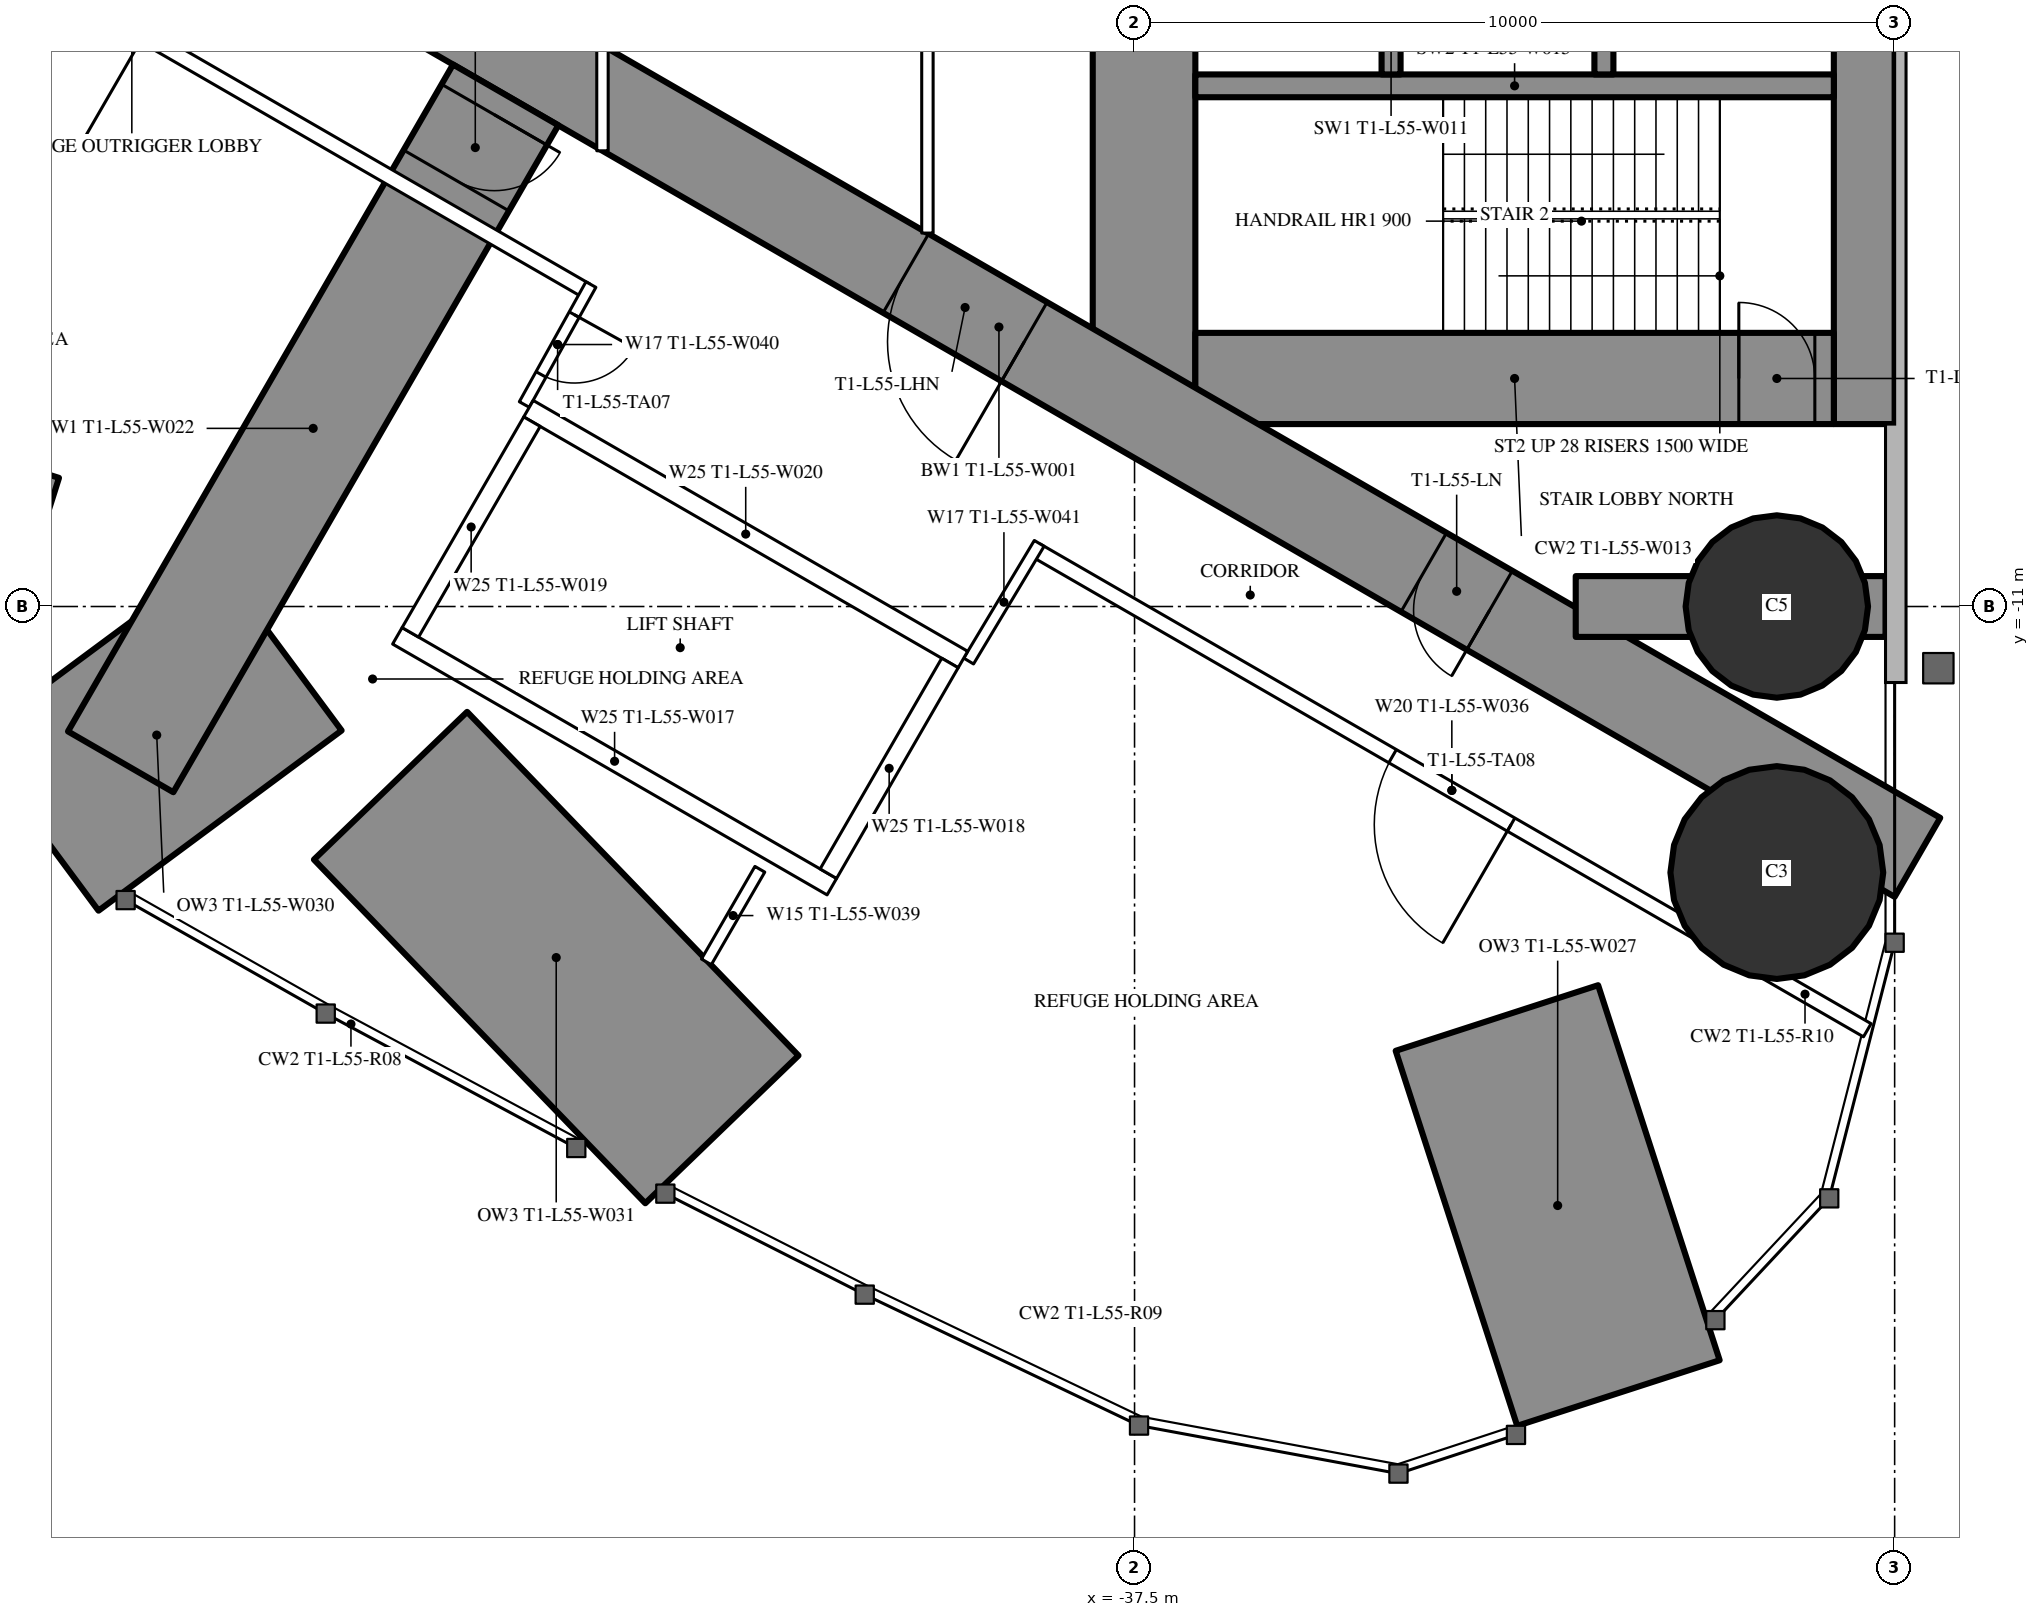
"""IFC4 building model, lengths in metres.
Left out: names, types, materials, properties, quantities, classifications, styles, units other than length and angle.
Written with IfcOpenShell. Run it as: python <this file> out.ifc"""

import sys

from ifc_helpers import new_model, si_unit, direction, frame, frame_2d, origin, origin_2d, place, context, subcontext, project, spatial, rectangle, circle, hollow_circle, extrude, element, fill, save


model = new_model("IFC4")
c1 = context("Model", 3, precision=1e-05, world=origin(), true_north=direction((0.0, 1.0)))
c2 = subcontext(c1, "Body", "Model", "MODEL_VIEW")
j1 = project(units=[si_unit("LENGTHUNIT", "METRE"), si_unit("PLANEANGLEUNIT", "RADIAN")], contexts=[c1])
p1 = place(None, origin())
s1 = spatial("IfcSite", under=j1, at=p1, CompositionType="ELEMENT")
p2 = place(p1, origin())
s2 = spatial("IfcBuilding", under=s1, at=p2, CompositionType="ELEMENT")
p3 = place(p2, frame((0.0, 0.0, 205.3)))
s3 = spatial("IfcBuildingStorey", under=s2, at=p3, CompositionType="ELEMENT", Elevation=205.3)
p4 = place(p3, frame((-31.134, -21.348, 0.0), z_axis=(0.0, 0.0, 1.0), x_axis=(-0.308266410133, 0.951300068529, 0.0)))
e1 = element("IfcWall", 1, at=p4, inside=s3, PredefinedType="SHEAR", context=c2, shape_type="SweptSolid", body=[
    extrude(rectangle(XDim=5.187, YDim=2.8, at=frame_2d((2.593, 0.0))), origin(), (0.0, 0.0, 1.0), 5.0),
])
p5 = place(p3, frame((-29.05, -11.0, 0.0), z_axis=(0.0, 0.0, 1.0), x_axis=(1.0, 0.0, 0.0)))
e2 = element("IfcColumn", 2, at=p5, inside=s3, PredefinedType="COLUMN", context=c2, shape_type="SweptSolid", body=[
    extrude(hollow_circle(Radius=1.2, WallThickness=0.09, at=origin_2d()), origin(), (0.0, 0.0, 1.0), 5.0),
])
p6 = place(p3, frame((-29.05, -14.5, 0.0), z_axis=(0.0, 0.0, 1.0), x_axis=(1.0, 0.0, 0.0)))
e3 = element("IfcColumn", 3, at=p6, inside=s3, PredefinedType="COLUMN", context=c2, shape_type="SweptSolid", body=[
    extrude(circle(Radius=1.4, at=origin_2d()), origin(), (0.0, 0.0, 1.0), 5.0),
])
p7 = place(p3, frame((-58.924, -8.47, 0.0), z_axis=(0.0, 0.0, 1.0), x_axis=(0.953237559777, -0.302222028698, 0.0)))
e4 = element("IfcWall", 4, at=p7, inside=s3, PredefinedType="SHEAR", context=c2, shape_type="SweptSolid", body=[
    extrude(rectangle(XDim=7.187, YDim=2.8, at=frame_2d((3.594, 0.0))), origin(), (0.0, 0.0, 1.0), 5.0),
])
p8 = place(p3, frame((-51.964, -13.877, 0.0), z_axis=(0.0, 0.0, 1.0), x_axis=(0.80337247009, 0.595476846151, 0.0)))
e5 = element("IfcWall", 5, at=p8, inside=s3, PredefinedType="SHEAR", context=c2, shape_type="SweptSolid", body=[
    extrude(rectangle(XDim=3.981, YDim=2.8, at=frame_2d((1.99, 0.0))), origin(), (0.0, 0.0, 1.0), 5.0),
])
p9 = place(p3, frame((-42.929, -17.879, 0.0), z_axis=(0.0, 0.0, 1.0), x_axis=(-0.694103918888, 0.719874815356, 0.0)))
e6 = element("IfcWall", 6, at=p9, inside=s3, PredefinedType="SHEAR", context=c2, shape_type="SweptSolid", body=[
    extrude(rectangle(XDim=6.281, YDim=2.8, at=frame_2d((3.141, 0.0))), origin(), (0.0, 0.0, 1.0), 5.0),
])
p10 = place(p3, frame((-27.9, 8.6, 0.0), z_axis=(0.0, 0.0, 1.0), x_axis=(0.0, -1.0, 0.0)))
e7 = element("IfcWall", 7, at=p10, inside=s3, PredefinedType="SHEAR", context=c2, shape_type="SweptSolid", body=[
    extrude(rectangle(XDim=17.2, YDim=0.8, at=frame_2d((8.6, 0.0))), origin(), (0.0, 0.0, 1.0), 5.0),
])
p11 = place(p10, frame((6.95, 0.0, 0.0)))
e8 = element("IfcOpeningElement", 8, at=p11, cuts=e7, PredefinedType="OPENING", context=c2, shape_type="SweptSolid", body=[
    extrude(rectangle(XDim=0.9, YDim=2.2, at=frame_2d((0.45, 1.1))), frame((0.0, 0.41, 0.0), z_axis=(0.0, -1.0, 0.0), x_axis=(1.0, 0.0, 0.0)), (0.0, 0.0, 1.0), 0.82),
])
p12 = place(p3, frame((-37.375, 8.6, 0.0), z_axis=(0.0, 0.0, 1.0), x_axis=(0.0, -1.0, 0.0)))
e9 = element("IfcWall", 9, at=p12, inside=s3, PredefinedType="SHEAR", context=c2, shape_type="SweptSolid", body=[
    extrude(rectangle(XDim=17.2, YDim=1.35, at=frame_2d((8.6, 0.0))), origin(), (0.0, 0.0, 1.0), 5.0),
])
p13 = place(p12, frame((7.7, 0.0, 0.0)))
e10 = element("IfcOpeningElement", 10, at=p13, cuts=e9, PredefinedType="OPENING", context=c2, shape_type="SweptSolid", body=[
    extrude(rectangle(XDim=1.8, YDim=2.2, at=frame_2d((0.9, 1.1))), frame((0.0, 0.685, 0.0), z_axis=(0.0, -1.0, 0.0), x_axis=(1.0, 0.0, 0.0)), (0.0, 0.0, 1.0), 1.37),
])
p14 = place(p3, frame((-28.3, -8.0, 0.0), z_axis=(0.0, 0.0, 1.0), x_axis=(-1.0, 0.0, 0.0)))
e11 = element("IfcWall", 11, at=p14, inside=s3, PredefinedType="SHEAR", context=c2, shape_type="SweptSolid", body=[
    extrude(rectangle(XDim=8.4, YDim=1.2, at=frame_2d((4.2, 0.0))), origin(), (0.0, 0.0, 1.0), 5.0),
])
p15 = place(p14, frame((0.25, 0.0, 0.0)))
e12 = element("IfcOpeningElement", 12, at=p15, cuts=e11, PredefinedType="OPENING", context=c2, shape_type="SweptSolid", body=[
    extrude(rectangle(XDim=1.0, YDim=2.2, at=frame_2d((0.5, 1.1))), frame((0.0, 0.61, 0.0), z_axis=(0.0, -1.0, 0.0), x_axis=(1.0, 0.0, 0.0)), (0.0, 0.0, 1.0), 1.22),
])
p16 = place(p3, frame((-28.3, -4.15, 0.0), z_axis=(0.0, 0.0, 1.0), x_axis=(-1.0, 0.0, 0.0)))
e13 = element("IfcWall", 13, at=p16, inside=s3, PredefinedType="SHEAR", context=c2, shape_type="SweptSolid", body=[
    extrude(rectangle(XDim=8.4, YDim=0.3, at=frame_2d((4.2, 0.0))), origin(), (0.0, 0.0, 1.0), 5.0),
])
p17 = place(p3, frame((-31.325, -1.9, 0.0), z_axis=(0.0, 0.0, 1.0), x_axis=(0.0, -1.0, 0.0)))
e14 = element("IfcWall", 14, at=p17, inside=s3, PredefinedType="SHEAR", context=c2, shape_type="SweptSolid", body=[
    extrude(rectangle(XDim=2.1, YDim=0.25, at=frame_2d((1.05, 0.0))), origin(), (0.0, 0.0, 1.0), 5.0),
])
p18 = place(p17, frame((0.5, 0.0, 0.0)))
e15 = element("IfcOpeningElement", 15, at=p18, cuts=e14, PredefinedType="OPENING", context=c2, shape_type="SweptSolid", body=[
    extrude(rectangle(XDim=1.1, YDim=2.2, at=frame_2d((0.55, 1.1))), frame((0.0, 0.135, 0.0), z_axis=(0.0, -1.0, 0.0), x_axis=(1.0, 0.0, 0.0)), (0.0, 0.0, 1.0), 0.27),
])
p19 = place(p3, frame((-34.125, -1.65, 0.0), z_axis=(0.0, 0.0, 1.0), x_axis=(0.0, -1.0, 0.0)))
e16 = element("IfcWall", 16, at=p19, inside=s3, PredefinedType="SHEAR", context=c2, shape_type="SweptSolid", body=[
    extrude(rectangle(XDim=2.35, YDim=0.25, at=frame_2d((1.175, 0.0))), origin(), (0.0, 0.0, 1.0), 5.0),
])
p20 = place(p19, frame((0.875, 0.0, 0.0)))
e17 = element("IfcOpeningElement", 17, at=p20, cuts=e16, PredefinedType="OPENING", context=c2, shape_type="SweptSolid", body=[
    extrude(rectangle(XDim=0.6, YDim=2.0, at=frame_2d((0.3, 1.0))), frame((0.0, 0.135, 0.0), z_axis=(0.0, -1.0, 0.0), x_axis=(1.0, 0.0, 0.0)), (0.0, 0.0, 1.0), 0.27),
])
p21 = place(p3, frame((-27.2, -14.3, 0.0), z_axis=(0.0, 0.0, 1.0), x_axis=(-0.866024021859, 0.500002393557, 0.0)))
e18 = element("IfcWall", 18, at=p21, inside=s3, PredefinedType="SHEAR", context=c2, shape_type="SweptSolid", body=[
    extrude(rectangle(XDim=27.907, YDim=1.2, at=frame_2d((13.954, 0.0))), origin(), (0.0, 0.0, 1.0), 5.0),
])
p22 = place(p21, frame((6.5, 0.0, 0.0)))
e19 = element("IfcOpeningElement", 19, at=p22, cuts=e18, PredefinedType="OPENING", context=c2, shape_type="SweptSolid", body=[
    extrude(rectangle(XDim=1.0, YDim=2.2, at=frame_2d((0.5, 1.1))), frame((0.0, 0.61, 0.0), z_axis=(0.0, -1.0, 0.0), x_axis=(1.0, 0.0, 0.0)), (0.0, 0.0, 1.0), 1.22),
])
p23 = place(p21, frame((13.568, 0.0, 0.0)))
e20 = element("IfcOpeningElement", 20, at=p23, cuts=e18, PredefinedType="OPENING", context=c2, shape_type="SweptSolid", body=[
    extrude(rectangle(XDim=1.8, YDim=2.2, at=frame_2d((0.9, 1.1))), frame((0.0, 0.61, 0.0), z_axis=(0.0, -1.0, 0.0), x_axis=(1.0, 0.0, 0.0)), (0.0, 0.0, 1.0), 1.22),
])
p24 = place(p3, frame((-27.62, -11.0, 0.0), z_axis=(0.0, 0.0, 1.0), x_axis=(-1.0, 0.0, 0.0)))
e21 = element("IfcWall", 21, at=p24, inside=s3, PredefinedType="SHEAR", context=c2, shape_type="SweptSolid", body=[
    extrude(rectangle(XDim=4.076, YDim=0.8, at=frame_2d((2.038, 0.0))), origin(), (0.0, 0.0, 1.0), 5.0),
])
p25 = place(p3, frame((-45.773, -4.27, 0.0), z_axis=(0.0, 0.0, 1.0), x_axis=(-0.499995723283, -0.866027872934, 0.0)))
e22 = element("IfcWall", 22, at=p25, inside=s3, PredefinedType="SHEAR", context=c2, shape_type="SweptSolid", body=[
    extrude(rectangle(XDim=10.131, YDim=1.6, at=frame_2d((5.065, 0.0))), origin(), (0.0, 0.0, 1.0), 5.0),
])
p26 = place(p25, frame((0.3, 0.0, 0.0)))
e23 = element("IfcOpeningElement", 23, at=p26, cuts=e22, PredefinedType="OPENING", context=c2, shape_type="SweptSolid", body=[
    extrude(rectangle(XDim=1.0, YDim=2.2, at=frame_2d((0.5, 1.1))), frame((0.0, 0.81, 0.0), z_axis=(0.0, -1.0, 0.0), x_axis=(1.0, 0.0, 0.0)), (0.0, 0.0, 1.0), 1.62),
])
p27 = place(p3, frame((-42.429, -14.457, 0.0), z_axis=(0.0, 0.0, 1.0), x_axis=(-0.5000578829, -0.865991982497, 0.0)))
e24 = element("IfcWall", 24, at=p27, inside=s3, PredefinedType="PARTITIONING", context=c2, shape_type="SweptSolid", body=[
    extrude(rectangle(XDim=1.407, YDim=0.15, at=frame_2d((0.704, 0.0))), origin(), (0.0, 0.0, 1.0), 4.75),
])
p28 = place(p3, frame((-27.86, -16.575, 0.0), z_axis=(0.0, 0.0, 1.0), x_axis=(-0.866027756871, 0.499995924312, 0.0)))
e25 = element("IfcWall", 25, at=p28, inside=s3, PredefinedType="PARTITIONING", context=c2, shape_type="SweptSolid", body=[
    extrude(rectangle(XDim=12.622, YDim=0.2, at=frame_2d((6.311, 0.0))), origin(), (0.0, 0.0, 1.0), 4.75),
])
p29 = place(p28, frame((5.411, 0.0, 0.0)))
e26 = element("IfcOpeningElement", 26, at=p29, cuts=e25, PredefinedType="OPENING", context=c2, shape_type="SweptSolid", body=[
    extrude(rectangle(XDim=1.8, YDim=2.2, at=frame_2d((0.9, 1.1))), frame((0.0, 0.11, 0.0), z_axis=(0.0, -1.0, 0.0), x_axis=(1.0, 0.0, 0.0)), (0.0, 0.0, 1.0), 0.22),
])
p30 = place(p3, frame((-44.715, -6.844, 0.0), z_axis=(0.0, 0.0, 1.0), x_axis=(-0.866025261224, 0.500000246922, 0.0)))
e27 = element("IfcWall", 27, at=p30, inside=s3, PredefinedType="PARTITIONING", context=c2, shape_type="SweptSolid", body=[
    extrude(rectangle(XDim=13.567, YDim=0.2, at=frame_2d((6.783, 0.0))), origin(), (0.0, 0.0, 1.0), 4.75),
])
p31 = place(p30, frame((6.719, 0.0, 0.0)))
e28 = element("IfcOpeningElement", 28, at=p31, cuts=e27, PredefinedType="OPENING", context=c2, shape_type="SweptSolid", body=[
    extrude(rectangle(XDim=1.8, YDim=2.2, at=frame_2d((0.9, 1.1))), frame((0.0, 0.11, 0.0), z_axis=(0.0, -1.0, 0.0), x_axis=(1.0, 0.0, 0.0)), (0.0, 0.0, 1.0), 0.22),
])
p32 = place(p3, frame((-44.652, -6.764, 0.0), z_axis=(0.0, 0.0, 1.0), x_axis=(-0.485528096672, -0.8742210632, 0.0)))
e29 = element("IfcWall", 29, at=p32, inside=s3, PredefinedType="PARTITIONING", context=c2, shape_type="SweptSolid", body=[
    extrude(rectangle(XDim=1.805, YDim=0.15, at=frame_2d((0.903, 0.0))), origin(), (0.0, 0.0, 1.0), 4.75),
])
p33 = place(p32, frame((0.453, 0.0, 0.0)))
e30 = element("IfcOpeningElement", 30, at=p33, cuts=e29, PredefinedType="OPENING", context=c2, shape_type="SweptSolid", body=[
    extrude(rectangle(XDim=0.9, YDim=2.2, at=frame_2d((0.45, 1.1))), frame((0.0, 0.085, 0.0), z_axis=(0.0, -1.0, 0.0), x_axis=(1.0, 0.0, 0.0)), (0.0, 0.0, 1.0), 0.17),
])
p34 = place(p3, frame((-39.683, -11.718, 0.0), z_axis=(0.0, 0.0, 1.0), x_axis=(0.514336634837, 0.857588377991, 0.0)))
e31 = element("IfcWall", 31, at=p34, inside=s3, PredefinedType="PARTITIONING", context=c2, shape_type="SweptSolid", body=[
    extrude(rectangle(XDim=1.805, YDim=0.15, at=frame_2d((0.903, 0.0))), origin(), (0.0, 0.0, 1.0), 4.75),
])
p35 = place(p3, frame((-40.225, 6.087, 0.0), z_axis=(0.0, 0.0, 1.0), x_axis=(0.0, -1.0, 0.0)))
e32 = element("IfcWall", 32, at=p35, inside=s3, PredefinedType="PARTITIONING", context=c2, shape_type="SweptSolid", body=[
    extrude(rectangle(XDim=12.174, YDim=0.15, at=frame_2d((6.087, 0.0))), origin(), (0.0, 0.0, 1.0), 4.75),
])
p36 = place(p35, frame((5.187, 0.0, 0.0)))
e33 = element("IfcOpeningElement", 33, at=p36, cuts=e32, PredefinedType="OPENING", context=c2, shape_type="SweptSolid", body=[
    extrude(rectangle(XDim=1.8, YDim=2.2, at=frame_2d((0.9, 1.1))), frame((0.0, 0.085, 0.0), z_axis=(0.0, -1.0, 0.0), x_axis=(1.0, 0.0, 0.0)), (0.0, 0.0, 1.0), 0.17),
])
p37 = place(p3, frame((-44.5, 5.005, 0.0), z_axis=(0.0, 0.0, 1.0), x_axis=(0.0, -1.0, 0.0)))
e34 = element("IfcWall", 34, at=p37, inside=s3, PredefinedType="PARTITIONING", context=c2, shape_type="SweptSolid", body=[
    extrude(rectangle(XDim=10.009, YDim=0.15, at=frame_2d((5.005, 0.0))), origin(), (0.0, 0.0, 1.0), 3.55),
])
p38 = place(p37, frame((4.505, 0.0, 0.0)))
e35 = element("IfcOpeningElement", 35, at=p38, cuts=e34, PredefinedType="OPENING", context=c2, shape_type="SweptSolid", body=[
    extrude(rectangle(XDim=1.0, YDim=2.2, at=frame_2d((0.5, 1.1))), frame((0.0, 0.085, 0.0), z_axis=(0.0, -1.0, 0.0), x_axis=(1.0, 0.0, 0.0)), (0.0, 0.0, 1.0), 0.17),
])
p39 = place(p3, frame((-39.758, -11.697, 0.0), z_axis=(0.0, 0.0, 1.0), x_axis=(-0.866024194504, 0.500002094529, 0.0)))
e36 = element("IfcWall", 36, at=p39, inside=s3, PredefinedType="PARTITIONING", context=c2, shape_type="SweptSolid", body=[
    extrude(rectangle(XDim=6.6, YDim=0.25, at=frame_2d((3.3, 0.0))), origin(), (0.0, 0.0, 1.0), 4.75),
])
p40 = place(p3, frame((-41.482, -14.686, 0.0), z_axis=(0.0, 0.0, 1.0), x_axis=(-0.86603344179, 0.499986077507, 0.0)))
e37 = element("IfcWall", 37, at=p40, inside=s3, PredefinedType="PARTITIONING", context=c2, shape_type="SweptSolid", body=[
    extrude(rectangle(XDim=6.6, YDim=0.25, at=frame_2d((3.3, 0.0))), origin(), (0.0, 0.0, 1.0), 4.75),
])
for number, where, z_axis, x_axis in (
    (38, (-39.928, -11.743, 0.0), (0.0, 0.0, 1.0), (-0.5, -0.866, 0.0)),
    (39, (-45.428, -8.568, 0.0), (0.0, 0.0, 1.0), (-0.5, -0.866, 0.0)),
):
    element("IfcWall", number, at=place(p3, frame(where, z_axis=z_axis, x_axis=x_axis)), inside=s3, PredefinedType="PARTITIONING", context=c2, shape_type="SweptSolid", body=[
        extrude(rectangle(XDim=3.201, YDim=0.25, at=frame_2d((1.6, 0.0))), origin(), (0.0, 0.0, 1.0), 4.75),
    ])
p41 = place(p26, origin())
e40 = element("IfcDoor", 40, at=p41, inside=s3, OperationType="SINGLE_SWING_LEFT", PredefinedType="DOOR", context=c2, shape_type="SweptSolid", body=[
    extrude(rectangle(XDim=1.0, YDim=2.2, at=frame_2d((0.5, 1.1))), frame((0.0, 0.025, 0.0), z_axis=(0.0, -1.0, 0.0), x_axis=(1.0, 0.0, 0.0)), (0.0, 0.0, 1.0), 0.05),
])
fill(e23, e40)
p42 = place(p33, origin())
e41 = element("IfcDoor", 41, at=p42, inside=s3, OperationType="SINGLE_SWING_LEFT", PredefinedType="DOOR", context=c2, shape_type="SweptSolid", body=[
    extrude(rectangle(XDim=0.9, YDim=2.2, at=frame_2d((0.45, 1.1))), frame((0.0, 0.025, 0.0), z_axis=(0.0, -1.0, 0.0), x_axis=(1.0, 0.0, 0.0)), (0.0, 0.0, 1.0), 0.05),
])
fill(e30, e41)
p43 = place(p29, origin())
e42 = element("IfcDoor", 42, at=p43, inside=s3, OperationType="DOUBLE_DOOR_SINGLE_SWING", PredefinedType="DOOR", context=c2, shape_type="SweptSolid", body=[
    extrude(rectangle(XDim=1.8, YDim=2.2, at=frame_2d((0.9, 1.1))), frame((0.0, 0.025, 0.0), z_axis=(0.0, -1.0, 0.0), x_axis=(1.0, 0.0, 0.0)), (0.0, 0.0, 1.0), 0.05),
])
fill(e26, e42)
p44 = place(p22, origin())
e43 = element("IfcDoor", 43, at=p44, inside=s3, OperationType="SINGLE_SWING_LEFT", PredefinedType="DOOR", context=c2, shape_type="SweptSolid", body=[
    extrude(rectangle(XDim=1.0, YDim=2.2, at=frame_2d((0.5, 1.1))), frame((0.0, 0.025, 0.0), z_axis=(0.0, -1.0, 0.0), x_axis=(1.0, 0.0, 0.0)), (0.0, 0.0, 1.0), 0.05),
])
fill(e19, e43)
p45 = place(p23, origin())
e44 = element("IfcDoor", 44, at=p45, inside=s3, OperationType="DOUBLE_DOOR_SINGLE_SWING", PredefinedType="DOOR", context=c2, shape_type="SweptSolid", body=[
    extrude(rectangle(XDim=1.8, YDim=2.2, at=frame_2d((0.9, 1.1))), frame((0.0, 0.025, 0.0), z_axis=(0.0, -1.0, 0.0), x_axis=(1.0, 0.0, 0.0)), (0.0, 0.0, 1.0), 0.05),
])
fill(e20, e44)
p46 = place(p15, origin())
e45 = element("IfcDoor", 45, at=p46, inside=s3, OperationType="SINGLE_SWING_RIGHT", PredefinedType="DOOR", context=c2, shape_type="SweptSolid", body=[
    extrude(rectangle(XDim=1.0, YDim=2.2, at=frame_2d((0.5, 1.1))), frame((0.0, 0.025, 0.0), z_axis=(0.0, -1.0, 0.0), x_axis=(1.0, 0.0, 0.0)), (0.0, 0.0, 1.0), 0.05),
])
fill(e12, e45)
save(model, sys.argv[1])
